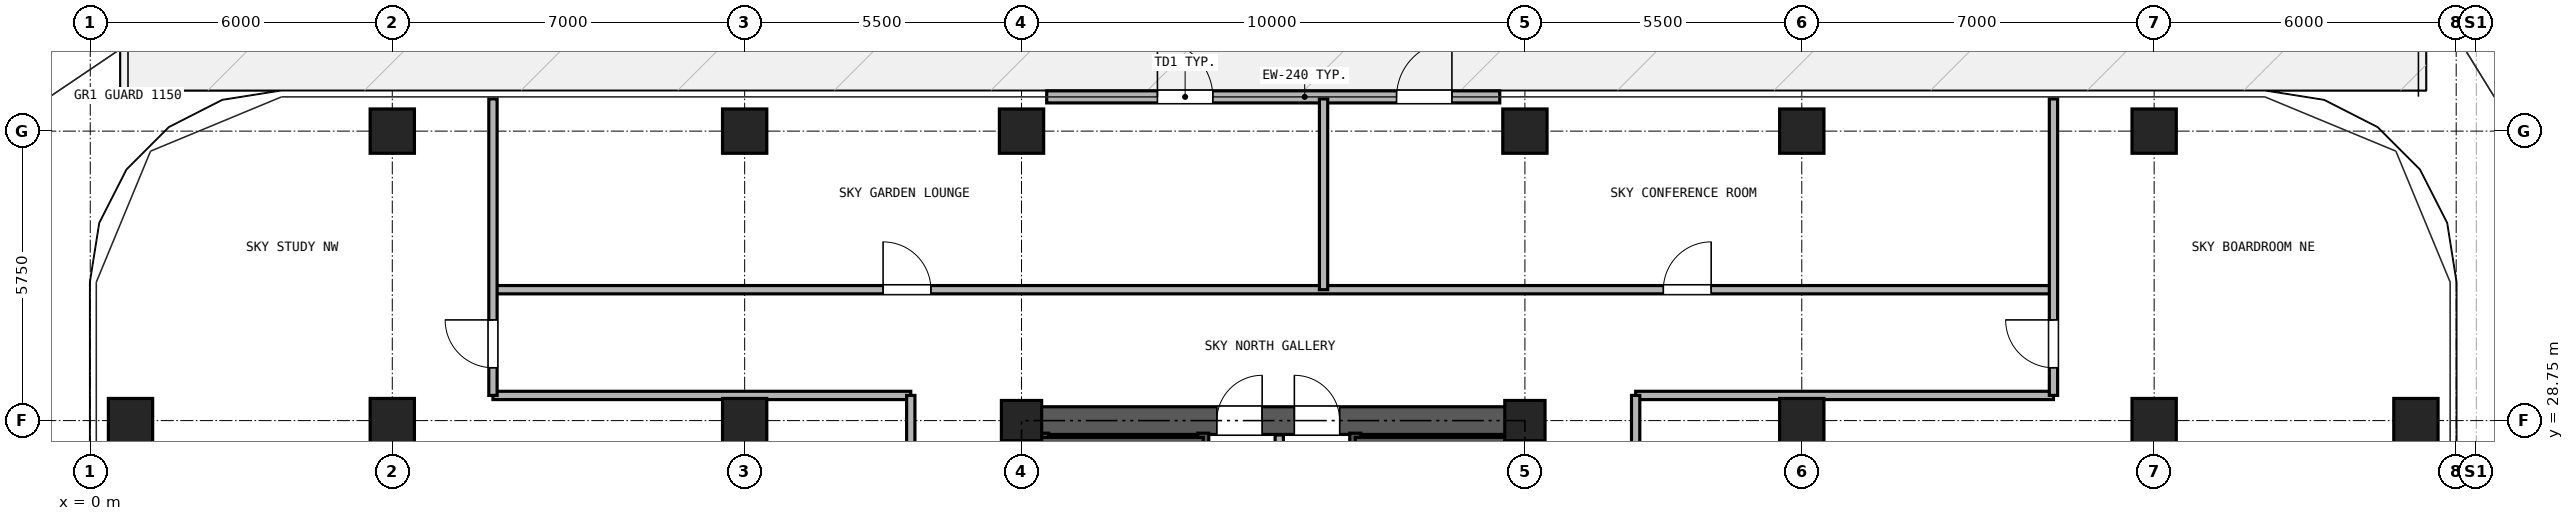
"""IFC4 building model, lengths in metres.
Left out: names, types, materials, properties, quantities, classifications, styles, units other than length and angle.
Written with IfcOpenShell. Run it as: python <this file> out.ifc"""

import sys

from ifc_helpers import new_model, si_unit, direction, frame, frame_2d, origin, origin_2d, place, context, subcontext, project, spatial, rectangle, hollow_rectangle, extrude, source, transform, mapped, element, fill, save


model = new_model("IFC4")
c1 = context("Model", 3, precision=1e-05, world=origin(), true_north=direction((0.0, 1.0)))
c2 = subcontext(c1, "Body", "Model", "MODEL_VIEW")
j1 = project(units=[si_unit("LENGTHUNIT", "METRE"), si_unit("PLANEANGLEUNIT", "RADIAN")], contexts=[c1])
p1 = place(None, origin())
s1 = spatial("IfcSite", under=j1, at=p1, CompositionType="ELEMENT")
p2 = place(p1, origin())
s2 = spatial("IfcBuilding", under=s1, at=p2, CompositionType="ELEMENT")
p3 = place(p2, frame((0.0, 0.0, 88.2)))
s3 = spatial("IfcBuildingStorey", under=s2, at=p3, CompositionType="ELEMENT", Elevation=88.2)
m1 = source(origin(), c2, "Body", "SweptSolid", [
    extrude(hollow_rectangle(XDim=0.88, YDim=0.88, WallThickness=0.05, at=origin_2d()), origin(), (0.0, 0.0, 1.0), 4.25),
])
for number, where, z_axis, x_axis in (
    (1, (6.0, 34.5, 0.0), (0.0, 0.0, 1.0), (1.0, 0.0, 0.0)),
    (2, (13.0, 34.5, 0.0), (0.0, 0.0, 1.0), (1.0, 0.0, 0.0)),
    (3, (18.5, 34.5, 0.0), (0.0, 0.0, 1.0), (1.0, 0.0, 0.0)),
    (4, (28.5, 34.5, 0.0), (0.0, 0.0, 1.0), (1.0, 0.0, 0.0)),
    (5, (34.0, 34.5, 0.0), (0.0, 0.0, 1.0), (1.0, 0.0, 0.0)),
    (6, (41.0, 34.5, 0.0), (0.0, 0.0, 1.0), (1.0, 0.0, 0.0)),
    (7, (0.8, 28.75, 0.0), (0.0, 0.0, 1.0), (1.0, 0.0, 0.0)),
    (8, (46.2, 28.75, 0.0), (0.0, 0.0, 1.0), (1.0, 0.0, 0.0)),
    (9, (6.0, 28.75, 0.0), (0.0, 0.0, 1.0), (1.0, 0.0, 0.0)),
    (10, (13.0, 28.75, 0.0), (0.0, 0.0, 1.0), (1.0, 0.0, 0.0)),
):
    element("IfcColumn", number, at=place(p3, frame(where, z_axis=z_axis, x_axis=x_axis)), inside=s3, PredefinedType="COLUMN", context=c2, shape_type="MappedRepresentation", body=[
        mapped(m1, transform((0.0, 0.0, 0.0), x_axis=(1.0, 0.0, 0.0), y_axis=(0.0, 1.0, 0.0), z_axis=(0.0, 0.0, 1.0), scale=1.0)),
    ])
m2 = source(origin(), c2, "Body", "SweptSolid", [
    extrude(hollow_rectangle(XDim=0.8, YDim=0.8, WallThickness=0.045, at=origin_2d()), origin(), (0.0, 0.0, 1.0), 4.25),
])
for number, where, z_axis, x_axis in (
    (11, (18.5, 28.75, 0.0), (0.0, 0.0, 1.0), (1.0, 0.0, 0.0)),
    (12, (28.5, 28.75, 0.0), (0.0, 0.0, 1.0), (1.0, 0.0, 0.0)),
):
    element("IfcColumn", number, at=place(p3, frame(where, z_axis=z_axis, x_axis=x_axis)), inside=s3, PredefinedType="COLUMN", context=c2, shape_type="MappedRepresentation", body=[
        mapped(m2, transform((0.0, 0.0, 0.0), x_axis=(1.0, 0.0, 0.0), y_axis=(0.0, 1.0, 0.0), z_axis=(0.0, 0.0, 1.0), scale=1.0)),
    ])
for number, where, z_axis, x_axis in (
    (13, (34.0, 28.75, 0.0), (0.0, 0.0, 1.0), (1.0, 0.0, 0.0)),
    (14, (41.0, 28.75, 0.0), (0.0, 0.0, 1.0), (1.0, 0.0, 0.0)),
):
    element("IfcColumn", number, at=place(p3, frame(where, z_axis=z_axis, x_axis=x_axis)), inside=s3, PredefinedType="COLUMN", context=c2, shape_type="MappedRepresentation", body=[
        mapped(m1, transform((0.0, 0.0, 0.0), x_axis=(1.0, 0.0, 0.0), y_axis=(0.0, 1.0, 0.0), z_axis=(0.0, 0.0, 1.0), scale=1.0)),
    ])
p4 = place(p3, frame((19.0, 35.18, 0.0), z_axis=(0.0, 0.0, 1.0), x_axis=(1.0, 0.0, 0.0)))
e15 = element("IfcWall", 15, at=p4, inside=s3, PredefinedType="SOLIDWALL", context=c2, shape_type="SweptSolid", body=[
    extrude(rectangle(XDim=9.0, YDim=0.24, at=frame_2d((4.5, 0.0))), origin(), (0.0, 0.0, 1.0), 4.25),
])
p5 = place(p4, frame((2.2, 0.0, 0.0)))
e16 = element("IfcOpeningElement", 16, at=p5, cuts=e15, PredefinedType="OPENING", context=c2, shape_type="SweptSolid", body=[
    extrude(rectangle(XDim=1.1, YDim=2.2, at=frame_2d((0.55, 1.1))), frame((0.0, 0.13, 0.0), z_axis=(0.0, -1.0, 0.0), x_axis=(1.0, 0.0, 0.0)), (0.0, 0.0, 1.0), 0.26),
])
p6 = place(p4, frame((6.95, 0.0, 0.0)))
e17 = element("IfcOpeningElement", 17, at=p6, cuts=e15, PredefinedType="OPENING", context=c2, shape_type="SweptSolid", body=[
    extrude(rectangle(XDim=1.1, YDim=2.2, at=frame_2d((0.55, 1.1))), frame((0.0, 0.13, 0.0), z_axis=(0.0, -1.0, 0.0), x_axis=(1.0, 0.0, 0.0)), (0.0, 0.0, 1.0), 0.26),
])
p7 = place(p3, frame((18.225, 28.75, 0.0), z_axis=(0.0, 0.0, 1.0), x_axis=(1.0, 0.0, 0.0)))
e18 = element("IfcWall", 18, at=p7, inside=s3, PredefinedType="SHEAR", context=c2, shape_type="SweptSolid", body=[
    extrude(rectangle(XDim=10.55, YDim=0.55, at=frame_2d((5.275, 0.0))), origin(), (0.0, 0.0, 1.0), 4.25),
])
p8 = place(p7, frame((4.155, 0.0, 0.0)))
e19 = element("IfcOpeningElement", 19, at=p8, cuts=e18, PredefinedType="OPENING", context=c2, shape_type="SweptSolid", body=[
    extrude(rectangle(XDim=0.9, YDim=2.05, at=frame_2d((0.45, 1.025))), frame((0.0, 0.285, 0.0), z_axis=(0.0, -1.0, 0.0), x_axis=(1.0, 0.0, 0.0)), (0.0, 0.0, 1.0), 0.57),
])
p9 = place(p7, frame((5.695, 0.0, 0.0)))
e20 = element("IfcOpeningElement", 20, at=p9, cuts=e18, PredefinedType="OPENING", context=c2, shape_type="SweptSolid", body=[
    extrude(rectangle(XDim=0.9, YDim=2.05, at=frame_2d((0.45, 1.025))), frame((0.0, 0.285, 0.0), z_axis=(0.0, -1.0, 0.0), x_axis=(1.0, 0.0, 0.0)), (0.0, 0.0, 1.0), 0.57),
])
p10 = place(p3, frame((18.5, 11.775, 0.0), z_axis=(0.0, 0.0, 1.0), x_axis=(0.0, 1.0, 0.0)))
e21 = element("IfcWall", 21, at=p10, inside=s3, PredefinedType="SHEAR", context=c2, shape_type="SweptSolid", body=[
    extrude(rectangle(XDim=16.7, YDim=0.55, at=frame_2d((8.35, 0.0))), origin(), (0.0, 0.0, 1.0), 4.25),
])
p11 = place(p10, frame((7.375, 0.0, 0.0)))
e22 = element("IfcOpeningElement", 22, at=p11, cuts=e21, PredefinedType="OPENING", context=c2, shape_type="SweptSolid", body=[
    extrude(rectangle(XDim=1.15, YDim=2.2, at=frame_2d((0.575, 1.1))), frame((0.0, 0.285, 0.0), z_axis=(0.0, -1.0, 0.0), x_axis=(1.0, 0.0, 0.0)), (0.0, 0.0, 1.0), 0.57),
])
p12 = place(p3, frame((28.5, 11.775, 0.0), z_axis=(0.0, 0.0, 1.0), x_axis=(0.0, 1.0, 0.0)))
e23 = element("IfcWall", 23, at=p12, inside=s3, PredefinedType="SHEAR", context=c2, shape_type="SweptSolid", body=[
    extrude(rectangle(XDim=16.7, YDim=0.55, at=frame_2d((8.35, 0.0))), origin(), (0.0, 0.0, 1.0), 4.25),
])
p13 = place(p12, frame((7.375, 0.0, 0.0)))
e24 = element("IfcOpeningElement", 24, at=p13, cuts=e23, PredefinedType="OPENING", context=c2, shape_type="SweptSolid", body=[
    extrude(rectangle(XDim=1.15, YDim=2.2, at=frame_2d((0.575, 1.1))), frame((0.0, 0.285, 0.0), z_axis=(0.0, -1.0, 0.0), x_axis=(1.0, 0.0, 0.0)), (0.0, 0.0, 1.0), 0.57),
])
for number, where, z_axis, x_axis in (
    (25, (18.93, 21.39, 0.0), (0.0, 0.0, 1.0), (0.0, 1.0, 0.0)),
    (26, (22.11, 21.39, 0.0), (0.0, 0.0, 1.0), (0.0, 1.0, 0.0)),
    (27, (25.13, 21.39, 0.0), (0.0, 0.0, 1.0), (0.0, 1.0, 0.0)),
):
    element("IfcWall", number, at=place(p3, frame(where, z_axis=z_axis, x_axis=x_axis)), inside=s3, PredefinedType="SOLIDWALL", context=c2, shape_type="SweptSolid", body=[
        extrude(rectangle(XDim=7.11, YDim=0.22, at=frame_2d((3.555, 0.0))), origin(), (0.0, 0.0, 1.0), 4.25),
    ])
p14 = place(p3, frame((18.785, 28.335, 0.0), z_axis=(0.0, 0.0, 1.0), x_axis=(1.0, 0.0, 0.0)))
e28 = element("IfcWall", 28, at=p14, inside=s3, PredefinedType="PARTITIONING", context=c2, shape_type="SweptSolid", body=[
    extrude(rectangle(XDim=3.325, YDim=0.165, at=frame_2d((1.663, 0.0))), origin(), (0.0, 0.0, 1.0), 4.25),
])
p15 = place(p3, frame((25.13, 28.335, 0.0), z_axis=(0.0, 0.0, 1.0), x_axis=(1.0, 0.0, 0.0)))
e29 = element("IfcWall", 29, at=p15, inside=s3, PredefinedType="PARTITIONING", context=c2, shape_type="SweptSolid", body=[
    extrude(rectangle(XDim=3.085, YDim=0.165, at=frame_2d((1.542, 0.0))), origin(), (0.0, 0.0, 1.0), 4.25),
])
p16 = place(p3, frame((28.167, 21.39, 0.0), z_axis=(0.0, 0.0, 1.0), x_axis=(0.0, 1.0, 0.0)))
e30 = element("IfcWall", 30, at=p16, inside=s3, PredefinedType="PARTITIONING", context=c2, shape_type="SweptSolid", body=[
    extrude(rectangle(XDim=6.945, YDim=0.135, at=frame_2d((3.473, 0.0))), origin(), (0.0, 0.0, 1.0), 4.25),
])
p17 = place(p3, frame((23.62, 24.4, 0.0), z_axis=(0.0, 0.0, 1.0), x_axis=(0.0, 1.0, 0.0)))
e31 = element("IfcWall", 31, at=p17, inside=s3, PredefinedType="PARTITIONING", context=c2, shape_type="SweptSolid", body=[
    extrude(rectangle(XDim=4.065, YDim=0.165, at=frame_2d((2.033, 0.0))), origin(), (0.0, 0.0, 1.0), 4.25),
])
p18 = place(p3, frame((8.0, 31.35, 0.0), z_axis=(0.0, 0.0, 1.0), x_axis=(1.0, 0.0, 0.0)))
e32 = element("IfcWall", 32, at=p18, inside=s3, PredefinedType="PARTITIONING", context=c2, shape_type="SweptSolid", body=[
    extrude(rectangle(XDim=31.0, YDim=0.165, at=frame_2d((15.5, 0.0))), origin(), (0.0, 0.0, 1.0), 4.25),
])
p19 = place(p18, frame((7.75, 0.0, 0.0)))
e33 = element("IfcOpeningElement", 33, at=p19, cuts=e32, PredefinedType="OPENING", context=c2, shape_type="SweptSolid", body=[
    extrude(rectangle(XDim=0.95, YDim=2.15, at=frame_2d((0.475, 1.075))), frame((0.0, 0.093, 0.0), z_axis=(0.0, -1.0, 0.0), x_axis=(1.0, 0.0, 0.0)), (0.0, 0.0, 1.0), 0.185),
])
p20 = place(p18, frame((23.25, 0.0, 0.0)))
e34 = element("IfcOpeningElement", 34, at=p20, cuts=e32, PredefinedType="OPENING", context=c2, shape_type="SweptSolid", body=[
    extrude(rectangle(XDim=0.95, YDim=2.15, at=frame_2d((0.475, 1.075))), frame((0.0, 0.093, 0.0), z_axis=(0.0, -1.0, 0.0), x_axis=(1.0, 0.0, 0.0)), (0.0, 0.0, 1.0), 0.185),
])
for number, where, z_axis, x_axis in (
    (35, (8.0, 29.25, 0.0), (0.0, 0.0, 1.0), (1.0, 0.0, 0.0)),
    (36, (30.7, 29.25, 0.0), (0.0, 0.0, 1.0), (1.0, 0.0, 0.0)),
):
    element("IfcWall", number, at=place(p3, frame(where, z_axis=z_axis, x_axis=x_axis)), inside=s3, PredefinedType="PARTITIONING", context=c2, shape_type="SweptSolid", body=[
        extrude(rectangle(XDim=8.3, YDim=0.165, at=frame_2d((4.15, 0.0))), origin(), (0.0, 0.0, 1.0), 4.25),
    ])
p21 = place(p3, frame((16.3, 10.9, 0.0), z_axis=(0.0, 0.0, 1.0), x_axis=(0.0, 1.0, 0.0)))
e37 = element("IfcWall", 37, at=p21, inside=s3, PredefinedType="PARTITIONING", context=c2, shape_type="SweptSolid", body=[
    extrude(rectangle(XDim=18.35, YDim=0.165, at=frame_2d((9.175, 0.0))), origin(), (0.0, 0.0, 1.0), 4.25),
])
p22 = place(p21, frame((4.05, 0.0, 0.0)))
e38 = element("IfcOpeningElement", 38, at=p22, cuts=e37, PredefinedType="OPENING", context=c2, shape_type="SweptSolid", body=[
    extrude(rectangle(XDim=0.95, YDim=2.15, at=frame_2d((0.475, 1.075))), frame((0.0, 0.093, 0.0), z_axis=(0.0, -1.0, 0.0), x_axis=(1.0, 0.0, 0.0)), (0.0, 0.0, 1.0), 0.185),
])
p23 = place(p21, frame((13.225, 0.0, 0.0)))
e39 = element("IfcOpeningElement", 39, at=p23, cuts=e37, PredefinedType="OPENING", context=c2, shape_type="SweptSolid", body=[
    extrude(rectangle(XDim=0.95, YDim=2.15, at=frame_2d((0.475, 1.075))), frame((0.0, 0.093, 0.0), z_axis=(0.0, -1.0, 0.0), x_axis=(1.0, 0.0, 0.0)), (0.0, 0.0, 1.0), 0.185),
])
p24 = place(p3, frame((30.7, 10.9, 0.0), z_axis=(0.0, 0.0, 1.0), x_axis=(0.0, 1.0, 0.0)))
e40 = element("IfcWall", 40, at=p24, inside=s3, PredefinedType="PARTITIONING", context=c2, shape_type="SweptSolid", body=[
    extrude(rectangle(XDim=18.35, YDim=0.165, at=frame_2d((9.175, 0.0))), origin(), (0.0, 0.0, 1.0), 4.25),
])
p25 = place(p24, frame((8.675, 0.0, 0.0)))
e41 = element("IfcOpeningElement", 41, at=p25, cuts=e40, PredefinedType="OPENING", context=c2, shape_type="SweptSolid", body=[
    extrude(rectangle(XDim=0.95, YDim=2.15, at=frame_2d((0.475, 1.075))), frame((0.0, 0.093, 0.0), z_axis=(0.0, -1.0, 0.0), x_axis=(1.0, 0.0, 0.0)), (0.0, 0.0, 1.0), 0.185),
])
p26 = place(p3, frame((8.0, 29.25, 0.0), z_axis=(0.0, 0.0, 1.0), x_axis=(0.0, 1.0, 0.0)))
e42 = element("IfcWall", 42, at=p26, inside=s3, PredefinedType="PARTITIONING", context=c2, shape_type="SweptSolid", body=[
    extrude(rectangle(XDim=5.89, YDim=0.165, at=frame_2d((2.945, 0.0))), origin(), (0.0, 0.0, 1.0), 4.25),
])
p27 = place(p26, frame((0.55, 0.0, 0.0)))
e43 = element("IfcOpeningElement", 43, at=p27, cuts=e42, PredefinedType="OPENING", context=c2, shape_type="SweptSolid", body=[
    extrude(rectangle(XDim=0.95, YDim=2.15, at=frame_2d((0.475, 1.075))), frame((0.0, 0.093, 0.0), z_axis=(0.0, -1.0, 0.0), x_axis=(1.0, 0.0, 0.0)), (0.0, 0.0, 1.0), 0.185),
])
p28 = place(p3, frame((39.0, 29.25, 0.0), z_axis=(0.0, 0.0, 1.0), x_axis=(0.0, 1.0, 0.0)))
e44 = element("IfcWall", 44, at=p28, inside=s3, PredefinedType="PARTITIONING", context=c2, shape_type="SweptSolid", body=[
    extrude(rectangle(XDim=5.89, YDim=0.165, at=frame_2d((2.945, 0.0))), origin(), (0.0, 0.0, 1.0), 4.25),
])
p29 = place(p28, frame((0.55, 0.0, 0.0)))
e45 = element("IfcOpeningElement", 45, at=p29, cuts=e44, PredefinedType="OPENING", context=c2, shape_type="SweptSolid", body=[
    extrude(rectangle(XDim=0.95, YDim=2.15, at=frame_2d((0.475, 1.075))), frame((0.0, 0.093, 0.0), z_axis=(0.0, -1.0, 0.0), x_axis=(1.0, 0.0, 0.0)), (0.0, 0.0, 1.0), 0.185),
])
p30 = place(p3, frame((24.5, 31.35, 0.0), z_axis=(0.0, 0.0, 1.0), x_axis=(0.0, 1.0, 0.0)))
e46 = element("IfcWall", 46, at=p30, inside=s3, PredefinedType="PARTITIONING", context=c2, shape_type="SweptSolid", body=[
    extrude(rectangle(XDim=3.79, YDim=0.165, at=frame_2d((1.895, 0.0))), origin(), (0.0, 0.0, 1.0), 4.25),
])
p31 = place(p5, frame((1.1, 0.0, 0.0), z_axis=(0.0, 0.0, 1.0), x_axis=(-1.0, 0.0, 0.0)))
e47 = element("IfcDoor", 47, at=p31, inside=s3, OperationType="SINGLE_SWING_LEFT", PredefinedType="DOOR", context=c2, shape_type="SweptSolid", body=[
    extrude(rectangle(XDim=1.1, YDim=2.2, at=frame_2d((0.55, 1.1))), frame((0.0, 0.025, 0.0), z_axis=(0.0, -1.0, 0.0), x_axis=(1.0, 0.0, 0.0)), (0.0, 0.0, 1.0), 0.05),
])
fill(e16, e47)
p32 = place(p6, frame((1.1, 0.0, 0.0), z_axis=(0.0, 0.0, 1.0), x_axis=(-1.0, 0.0, 0.0)))
e48 = element("IfcDoor", 48, at=p32, inside=s3, OperationType="SINGLE_SWING_RIGHT", PredefinedType="DOOR", context=c2, shape_type="SweptSolid", body=[
    extrude(rectangle(XDim=1.1, YDim=2.2, at=frame_2d((0.55, 1.1))), frame((0.0, 0.025, 0.0), z_axis=(0.0, -1.0, 0.0), x_axis=(1.0, 0.0, 0.0)), (0.0, 0.0, 1.0), 0.05),
])
fill(e17, e48)
p33 = place(p8, origin())
e49 = element("IfcDoor", 49, at=p33, inside=s3, OperationType="SINGLE_SWING_RIGHT", PredefinedType="DOOR", context=c2, shape_type="SweptSolid", body=[
    extrude(rectangle(XDim=0.9, YDim=2.05, at=frame_2d((0.45, 1.025))), frame((0.0, 0.025, 0.0), z_axis=(0.0, -1.0, 0.0), x_axis=(1.0, 0.0, 0.0)), (0.0, 0.0, 1.0), 0.05),
])
fill(e19, e49)
p34 = place(p9, origin())
e50 = element("IfcDoor", 50, at=p34, inside=s3, OperationType="SINGLE_SWING_LEFT", PredefinedType="DOOR", context=c2, shape_type="SweptSolid", body=[
    extrude(rectangle(XDim=0.9, YDim=2.05, at=frame_2d((0.45, 1.025))), frame((0.0, 0.025, 0.0), z_axis=(0.0, -1.0, 0.0), x_axis=(1.0, 0.0, 0.0)), (0.0, 0.0, 1.0), 0.05),
])
fill(e20, e50)
p35 = place(p19, origin())
e51 = element("IfcDoor", 51, at=p35, inside=s3, OperationType="SINGLE_SWING_LEFT", PredefinedType="DOOR", context=c2, shape_type="SweptSolid", body=[
    extrude(rectangle(XDim=0.95, YDim=2.15, at=frame_2d((0.475, 1.075))), frame((0.0, 0.025, 0.0), z_axis=(0.0, -1.0, 0.0), x_axis=(1.0, 0.0, 0.0)), (0.0, 0.0, 1.0), 0.05),
])
fill(e33, e51)
p36 = place(p20, origin())
e52 = element("IfcDoor", 52, at=p36, inside=s3, OperationType="SINGLE_SWING_RIGHT", PredefinedType="DOOR", context=c2, shape_type="SweptSolid", body=[
    extrude(rectangle(XDim=0.95, YDim=2.15, at=frame_2d((0.475, 1.075))), frame((0.0, 0.025, 0.0), z_axis=(0.0, -1.0, 0.0), x_axis=(1.0, 0.0, 0.0)), (0.0, 0.0, 1.0), 0.05),
])
fill(e34, e52)
p37 = place(p27, frame((0.95, 0.0, 0.0), z_axis=(0.0, 0.0, 1.0), x_axis=(-1.0, 0.0, 0.0)))
e53 = element("IfcDoor", 53, at=p37, inside=s3, OperationType="SINGLE_SWING_RIGHT", PredefinedType="DOOR", context=c2, shape_type="SweptSolid", body=[
    extrude(rectangle(XDim=0.95, YDim=2.15, at=frame_2d((0.475, 1.075))), frame((0.0, 0.025, 0.0), z_axis=(0.0, -1.0, 0.0), x_axis=(1.0, 0.0, 0.0)), (0.0, 0.0, 1.0), 0.05),
])
fill(e43, e53)
p38 = place(p29, origin())
e54 = element("IfcDoor", 54, at=p38, inside=s3, OperationType="SINGLE_SWING_RIGHT", PredefinedType="DOOR", context=c2, shape_type="SweptSolid", body=[
    extrude(rectangle(XDim=0.95, YDim=2.15, at=frame_2d((0.475, 1.075))), frame((0.0, 0.025, 0.0), z_axis=(0.0, -1.0, 0.0), x_axis=(1.0, 0.0, 0.0)), (0.0, 0.0, 1.0), 0.05),
])
fill(e45, e54)
save(model, sys.argv[1])
